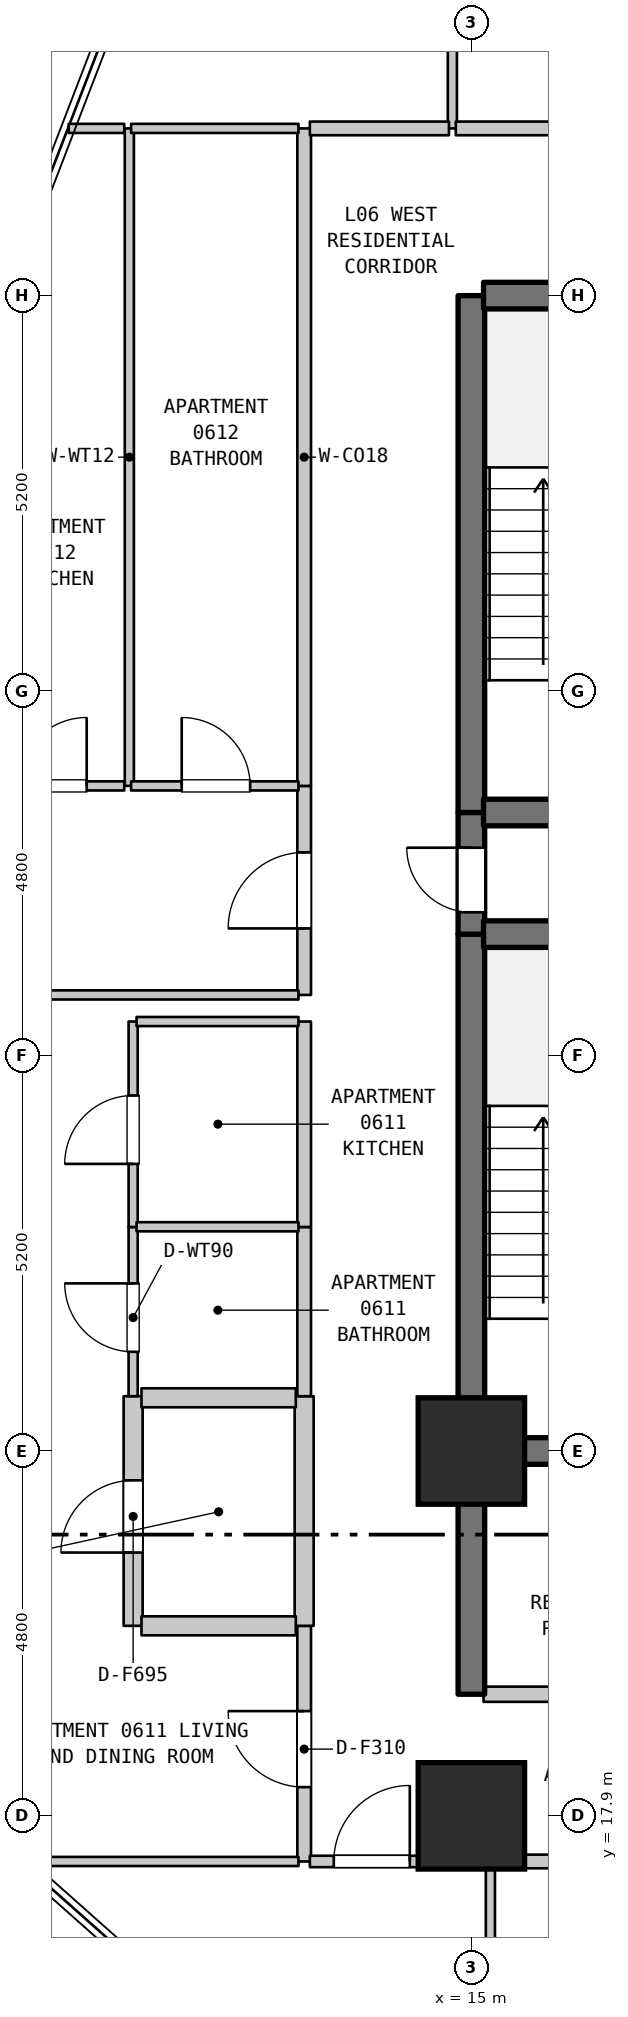
"""IFC4 building model, lengths in metres.
Left out: names, types, materials, properties, quantities, classifications, styles, units other than length and angle.
Written with IfcOpenShell. Run it as: python <this file> out.ifc"""

import sys

from ifc_helpers import new_model, si_unit, direction, frame, frame_2d, origin, origin_2d, place, context, subcontext, project, spatial, rectangle, extrude, element, fill, save


model = new_model("IFC4")
c1 = context("Model", 3, precision=1e-05, world=origin(), true_north=direction((0.0, 1.0)))
c2 = subcontext(c1, "Body", "Model", "MODEL_VIEW")
j1 = project(units=[si_unit("LENGTHUNIT", "METRE"), si_unit("PLANEANGLEUNIT", "RADIAN")], contexts=[c1])
p1 = place(None, origin())
s1 = spatial("IfcSite", under=j1, at=p1, CompositionType="ELEMENT")
p2 = place(p1, origin())
s2 = spatial("IfcBuilding", under=s1, at=p2, CompositionType="ELEMENT")
p3 = place(p2, frame((0.0, 0.0, 31.4)))
s3 = spatial("IfcBuildingStorey", under=s2, at=p3, CompositionType="ELEMENT", Elevation=31.4)
for number, where, z_axis, x_axis in (
    (1, (15.0, 17.9, 0.0), (0.0, 0.0, 1.0), (1.0, 0.0, 0.0)),
    (2, (15.0, 22.7, 0.0), (0.0, 0.0, 1.0), (1.0, 0.0, 0.0)),
):
    element("IfcColumn", number, at=place(p3, frame(where, z_axis=z_axis, x_axis=x_axis)), inside=s3, PredefinedType="COLUMN", context=c2, shape_type="SweptSolid", body=[
        extrude(rectangle(XDim=1.4, YDim=1.4, at=origin_2d()), origin(), (0.0, 0.0, 1.0), 3.7),
    ])
p4 = place(p3, frame((10.5, 31.45, 0.0), z_axis=(0.0, 0.0, 1.0), x_axis=(0.0, 1.0, 0.0)))
e3 = element("IfcWall", 3, at=p4, inside=s3, PredefinedType="PARTITIONING", context=c2, shape_type="SweptSolid", body=[
    extrude(rectangle(XDim=8.65, YDim=0.12, at=frame_2d((4.325, 0.0))), origin(), (0.0, 0.0, 1.0), 3.385),
])
p5 = place(p3, frame((10.55, 20.4, 0.0), z_axis=(0.0, 0.0, 1.0), x_axis=(0.0, 1.0, 0.0)))
e4 = element("IfcWall", 4, at=p5, inside=s3, PredefinedType="STANDARD", context=c2, shape_type="SweptSolid", body=[
    extrude(rectangle(XDim=3.021, YDim=0.25, at=frame_2d((1.51, 0.0))), origin(), (0.0, 0.0, 1.0), 3.385),
])
p6 = place(p5, frame((0.964, 0.0, 0.0)))
e5 = element("IfcOpeningElement", 5, at=p6, cuts=e4, PredefinedType="OPENING", context=c2, shape_type="SweptSolid", body=[
    extrude(rectangle(XDim=0.95, YDim=2.15, at=frame_2d((0.475, 1.075))), frame((0.0, 0.135, 0.0), z_axis=(0.0, -1.0, 0.0), x_axis=(1.0, 0.0, 0.0)), (0.0, 0.0, 1.0), 0.27),
])
p7 = place(p3, frame((10.55, 23.421, 0.0), z_axis=(0.0, 0.0, 1.0), x_axis=(0.0, 1.0, 0.0)))
e6 = element("IfcWall", 6, at=p7, inside=s3, PredefinedType="PARTITIONING", context=c2, shape_type="SweptSolid", body=[
    extrude(rectangle(XDim=2.226, YDim=0.12, at=frame_2d((1.113, 0.0))), origin(), (0.0, 0.0, 1.0), 3.385),
])
p8 = place(p7, frame((0.584, 0.0, 0.0)))
e7 = element("IfcOpeningElement", 7, at=p8, cuts=e6, PredefinedType="OPENING", context=c2, shape_type="SweptSolid", body=[
    extrude(rectangle(XDim=0.9, YDim=2.1, at=frame_2d((0.45, 1.05))), frame((0.0, 0.07, 0.0), z_axis=(0.0, -1.0, 0.0), x_axis=(1.0, 0.0, 0.0)), (0.0, 0.0, 1.0), 0.14),
])
p9 = place(p3, frame((10.55, 25.647, 0.0), z_axis=(0.0, 0.0, 1.0), x_axis=(0.0, 1.0, 0.0)))
e8 = element("IfcWall", 8, at=p9, inside=s3, PredefinedType="PARTITIONING", context=c2, shape_type="SweptSolid", body=[
    extrude(rectangle(XDim=2.703, YDim=0.12, at=frame_2d((1.352, 0.0))), origin(), (0.0, 0.0, 1.0), 3.385),
])
p10 = place(p9, frame((0.83, 0.0, 0.0)))
e9 = element("IfcOpeningElement", 9, at=p10, cuts=e8, PredefinedType="OPENING", context=c2, shape_type="SweptSolid", body=[
    extrude(rectangle(XDim=0.9, YDim=2.15, at=frame_2d((0.45, 1.075))), frame((0.0, 0.07, 0.0), z_axis=(0.0, -1.0, 0.0), x_axis=(1.0, 0.0, 0.0)), (0.0, 0.0, 1.0), 0.14),
])
p11 = place(p3, frame((12.8, 17.3, 0.0), z_axis=(0.0, 0.0, 1.0), x_axis=(0.0, 1.0, 0.0)))
e10 = element("IfcWall", 10, at=p11, inside=s3, PredefinedType="STANDARD", context=c2, shape_type="SweptSolid", body=[
    extrude(rectangle(XDim=3.1, YDim=0.18, at=frame_2d((1.55, 0.0))), origin(), (0.0, 0.0, 1.0), 3.385),
])
p12 = place(p11, frame((0.978, 0.0, 0.0)))
e11 = element("IfcOpeningElement", 11, at=p12, cuts=e10, PredefinedType="OPENING", context=c2, shape_type="SweptSolid", body=[
    extrude(rectangle(XDim=1.0, YDim=2.15, at=frame_2d((0.5, 1.075))), frame((0.0, 0.1, 0.0), z_axis=(0.0, -1.0, 0.0), x_axis=(1.0, 0.0, 0.0)), (0.0, 0.0, 1.0), 0.2),
])
p13 = place(p3, frame((12.8, 20.4, 0.0), z_axis=(0.0, 0.0, 1.0), x_axis=(0.0, 1.0, 0.0)))
e12 = element("IfcWall", 12, at=p13, inside=s3, PredefinedType="STANDARD", context=c2, shape_type="SweptSolid", body=[
    extrude(rectangle(XDim=3.021, YDim=0.25, at=frame_2d((1.51, 0.0))), origin(), (0.0, 0.0, 1.0), 3.385),
])
p14 = place(p3, frame((12.8, 23.421, 0.0), z_axis=(0.0, 0.0, 1.0), x_axis=(0.0, 1.0, 0.0)))
e13 = element("IfcWall", 13, at=p14, inside=s3, PredefinedType="STANDARD", context=c2, shape_type="SweptSolid", body=[
    extrude(rectangle(XDim=2.226, YDim=0.18, at=frame_2d((1.113, 0.0))), origin(), (0.0, 0.0, 1.0), 3.385),
])
p15 = place(p3, frame((12.8, 25.647, 0.0), z_axis=(0.0, 0.0, 1.0), x_axis=(0.0, 1.0, 0.0)))
e14 = element("IfcWall", 14, at=p15, inside=s3, PredefinedType="STANDARD", context=c2, shape_type="SweptSolid", body=[
    extrude(rectangle(XDim=2.703, YDim=0.18, at=frame_2d((1.352, 0.0))), origin(), (0.0, 0.0, 1.0), 3.385),
])
p16 = place(p3, frame((12.8, 28.7, 0.0), z_axis=(0.0, 0.0, 1.0), x_axis=(0.0, 1.0, 0.0)))
e15 = element("IfcWall", 15, at=p16, inside=s3, PredefinedType="STANDARD", context=c2, shape_type="SweptSolid", body=[
    extrude(rectangle(XDim=2.75, YDim=0.18, at=frame_2d((1.375, 0.0))), origin(), (0.0, 0.0, 1.0), 3.385),
])
p17 = place(p16, frame((0.875, 0.0, 0.0)))
e16 = element("IfcOpeningElement", 16, at=p17, cuts=e15, PredefinedType="OPENING", context=c2, shape_type="SweptSolid", body=[
    extrude(rectangle(XDim=1.0, YDim=2.15, at=frame_2d((0.5, 1.075))), frame((0.0, 0.1, 0.0), z_axis=(0.0, -1.0, 0.0), x_axis=(1.0, 0.0, 0.0)), (0.0, 0.0, 1.0), 0.2),
])
p18 = place(p3, frame((12.8, 31.45, 0.0), z_axis=(0.0, 0.0, 1.0), x_axis=(0.0, 1.0, 0.0)))
e17 = element("IfcWall", 17, at=p18, inside=s3, PredefinedType="STANDARD", context=c2, shape_type="SweptSolid", body=[
    extrude(rectangle(XDim=8.65, YDim=0.18, at=frame_2d((4.325, 0.0))), origin(), (0.0, 0.0, 1.0), 3.385),
])
p19 = place(p3, frame((14.75, 40.1, 0.0), z_axis=(0.0, 0.0, 1.0), x_axis=(0.0, 1.0, 0.0)))
e18 = element("IfcWall", 18, at=p19, inside=s3, PredefinedType="PARTITIONING", context=c2, shape_type="SweptSolid", body=[
    extrude(rectangle(XDim=3.2, YDim=0.12, at=frame_2d((1.6, 0.0))), origin(), (0.0, 0.0, 1.0), 3.385),
])
p20 = place(p19, frame((1.15, 0.0, 0.0)))
e19 = element("IfcOpeningElement", 19, at=p20, cuts=e18, PredefinedType="OPENING", context=c2, shape_type="SweptSolid", body=[
    extrude(rectangle(XDim=0.9, YDim=2.15, at=frame_2d((0.45, 1.075))), frame((0.0, 0.07, 0.0), z_axis=(0.0, -1.0, 0.0), x_axis=(1.0, 0.0, 0.0)), (0.0, 0.0, 1.0), 0.14),
])
p21 = place(p3, frame((15.0, 19.5, 0.0), z_axis=(0.0, 0.0, 1.0), x_axis=(0.0, 1.0, 0.0)))
e20 = element("IfcWall", 20, at=p21, inside=s3, PredefinedType="SHEAR", context=c2, shape_type="SweptSolid", body=[
    extrude(rectangle(XDim=3.2, YDim=0.35, at=frame_2d((1.6, 0.0))), origin(), (0.0, 0.0, 1.0), 3.385),
])
p22 = place(p3, frame((15.0, 22.7, 0.0), z_axis=(0.0, 0.0, 1.0), x_axis=(0.0, 1.0, 0.0)))
e21 = element("IfcWall", 21, at=p22, inside=s3, PredefinedType="SHEAR", context=c2, shape_type="SweptSolid", body=[
    extrude(rectangle(XDim=6.8, YDim=0.35, at=frame_2d((3.4, 0.0))), origin(), (0.0, 0.0, 1.0), 3.385),
])
p23 = place(p3, frame((15.0, 29.5, 0.0), z_axis=(0.0, 0.0, 1.0), x_axis=(0.0, 1.0, 0.0)))
e22 = element("IfcWall", 22, at=p23, inside=s3, PredefinedType="SHEAR", context=c2, shape_type="SweptSolid", body=[
    extrude(rectangle(XDim=1.6, YDim=0.35, at=frame_2d((0.8, 0.0))), origin(), (0.0, 0.0, 1.0), 3.385),
])
p24 = place(p23, frame((0.287, 0.0, 0.0)))
e23 = element("IfcOpeningElement", 23, at=p24, cuts=e22, PredefinedType="OPENING", context=c2, shape_type="SweptSolid", body=[
    extrude(rectangle(XDim=0.85, YDim=2.1, at=frame_2d((0.425, 1.05))), frame((0.0, 0.185, 0.0), z_axis=(0.0, -1.0, 0.0), x_axis=(1.0, 0.0, 0.0)), (0.0, 0.0, 1.0), 0.37),
])
p25 = place(p3, frame((15.0, 31.1, 0.0), z_axis=(0.0, 0.0, 1.0), x_axis=(0.0, 1.0, 0.0)))
e24 = element("IfcWall", 24, at=p25, inside=s3, PredefinedType="SHEAR", context=c2, shape_type="SweptSolid", body=[
    extrude(rectangle(XDim=6.8, YDim=0.35, at=frame_2d((3.4, 0.0))), origin(), (0.0, 0.0, 1.0), 3.385),
])
p26 = place(p3, frame((15.25, 14.1, 0.0), z_axis=(0.0, 0.0, 1.0), x_axis=(0.0, 1.0, 0.0)))
e25 = element("IfcWall", 25, at=p26, inside=s3, PredefinedType="PARTITIONING", context=c2, shape_type="SweptSolid", body=[
    extrude(rectangle(XDim=3.2, YDim=0.12, at=frame_2d((1.6, 0.0))), origin(), (0.0, 0.0, 1.0), 3.385),
])
p27 = place(p3, frame((9.085, 17.3, 0.0), z_axis=(0.0, 0.0, 1.0), x_axis=(1.0, 0.0, 0.0)))
e26 = element("IfcWall", 26, at=p27, inside=s3, PredefinedType="PARTITIONING", context=c2, shape_type="SweptSolid", body=[
    extrude(rectangle(XDim=3.64, YDim=0.12, at=frame_2d((1.82, 0.0))), origin(), (0.0, 0.0, 1.0), 3.385),
])
p28 = place(p3, frame((12.875, 17.3, 0.0), z_axis=(0.0, 0.0, 1.0), x_axis=(1.0, 0.0, 0.0)))
e27 = element("IfcWall", 27, at=p28, inside=s3, PredefinedType="STANDARD", context=c2, shape_type="SweptSolid", body=[
    extrude(rectangle(XDim=2.33, YDim=0.15, at=frame_2d((1.165, 0.0))), origin(), (0.0, 0.0, 1.0), 3.385),
])
p29 = place(p28, frame((0.315, 0.0, 0.0)))
e28 = element("IfcOpeningElement", 28, at=p29, cuts=e27, PredefinedType="OPENING", context=c2, shape_type="SweptSolid", body=[
    extrude(rectangle(XDim=1.0, YDim=2.15, at=frame_2d((0.5, 1.075))), frame((0.0, 0.085, 0.0), z_axis=(0.0, -1.0, 0.0), x_axis=(1.0, 0.0, 0.0)), (0.0, 0.0, 1.0), 0.17),
])
p30 = place(p3, frame((15.295, 17.3, 0.0), z_axis=(0.0, 0.0, 1.0), x_axis=(1.0, 0.0, 0.0)))
e29 = element("IfcWall", 29, at=p30, inside=s3, PredefinedType="STANDARD", context=c2, shape_type="SweptSolid", body=[
    extrude(rectangle(XDim=2.26, YDim=0.18, at=frame_2d((1.13, 0.0))), origin(), (0.0, 0.0, 1.0), 3.385),
])
p31 = place(p3, frame((15.16, 19.5, 0.0), z_axis=(0.0, 0.0, 1.0), x_axis=(1.0, 0.0, 0.0)))
e30 = element("IfcWall", 30, at=p31, inside=s3, PredefinedType="STANDARD", context=c2, shape_type="SweptSolid", body=[
    extrude(rectangle(XDim=3.68, YDim=0.2, at=frame_2d((1.84, 0.0))), origin(), (0.0, 0.0, 1.0), 3.385),
])
p32 = place(p31, frame((1.39, 0.0, 0.0)))
e31 = element("IfcOpeningElement", 31, at=p32, cuts=e30, PredefinedType="OPENING", context=c2, shape_type="SweptSolid", body=[
    extrude(rectangle(XDim=0.9, YDim=2.15, at=frame_2d((0.45, 1.075))), frame((0.0, 0.11, 0.0), z_axis=(0.0, -1.0, 0.0), x_axis=(1.0, 0.0, 0.0)), (0.0, 0.0, 1.0), 0.22),
])
p33 = place(p3, frame((10.66, 20.4, 0.0), z_axis=(0.0, 0.0, 1.0), x_axis=(1.0, 0.0, 0.0)))
e32 = element("IfcWall", 32, at=p33, inside=s3, PredefinedType="STANDARD", context=c2, shape_type="SweptSolid", body=[
    extrude(rectangle(XDim=2.03, YDim=0.25, at=frame_2d((1.015, 0.0))), origin(), (0.0, 0.0, 1.0), 3.385),
])
p34 = place(p3, frame((15.16, 22.7, 0.0), z_axis=(0.0, 0.0, 1.0), x_axis=(1.0, 0.0, 0.0)))
e33 = element("IfcWall", 33, at=p34, inside=s3, PredefinedType="SHEAR", context=c2, shape_type="SweptSolid", body=[
    extrude(rectangle(XDim=3.68, YDim=0.35, at=frame_2d((1.84, 0.0))), origin(), (0.0, 0.0, 1.0), 3.385),
])
p35 = place(p3, frame((10.66, 23.4, 0.0), z_axis=(0.0, 0.0, 1.0), x_axis=(1.0, 0.0, 0.0)))
e34 = element("IfcWall", 34, at=p35, inside=s3, PredefinedType="STANDARD", context=c2, shape_type="SweptSolid", body=[
    extrude(rectangle(XDim=2.03, YDim=0.25, at=frame_2d((1.015, 0.0))), origin(), (0.0, 0.0, 1.0), 3.385),
])
for number, where, z_axis, x_axis in (
    (35, (10.595, 25.65, 0.0), (0.0, 0.0, 1.0), (1.0, 0.0, 0.0)),
    (36, (10.595, 28.35, 0.0), (0.0, 0.0, 1.0), (1.0, 0.0, 0.0)),
):
    element("IfcWall", number, at=place(p3, frame(where, z_axis=z_axis, x_axis=x_axis)), inside=s3, PredefinedType="PARTITIONING", context=c2, shape_type="SweptSolid", body=[
        extrude(rectangle(XDim=2.13, YDim=0.12, at=frame_2d((1.065, 0.0))), origin(), (0.0, 0.0, 1.0), 3.385),
    ])
p36 = place(p3, frame((9.03, 28.7, 0.0), z_axis=(0.0, 0.0, 1.0), x_axis=(1.0, 0.0, 0.0)))
e37 = element("IfcWall", 37, at=p36, inside=s3, PredefinedType="PARTITIONING", context=c2, shape_type="SweptSolid", body=[
    extrude(rectangle(XDim=3.695, YDim=0.12, at=frame_2d((1.848, 0.0))), origin(), (0.0, 0.0, 1.0), 3.385),
])
for number, where, z_axis, x_axis in (
    (38, (15.16, 29.5, 0.0), (0.0, 0.0, 1.0), (1.0, 0.0, 0.0)),
    (39, (15.16, 31.1, 0.0), (0.0, 0.0, 1.0), (1.0, 0.0, 0.0)),
):
    element("IfcWall", number, at=place(p3, frame(where, z_axis=z_axis, x_axis=x_axis)), inside=s3, PredefinedType="SHEAR", context=c2, shape_type="SweptSolid", body=[
        extrude(rectangle(XDim=3.68, YDim=0.35, at=frame_2d((1.84, 0.0))), origin(), (0.0, 0.0, 1.0), 3.385),
    ])
p37 = place(p3, frame((8.545, 31.45, 0.0), z_axis=(0.0, 0.0, 1.0), x_axis=(1.0, 0.0, 0.0)))
e40 = element("IfcWall", 40, at=p37, inside=s3, PredefinedType="PARTITIONING", context=c2, shape_type="SweptSolid", body=[
    extrude(rectangle(XDim=1.888, YDim=0.12, at=frame_2d((0.944, 0.0))), origin(), (0.0, 0.0, 1.0), 3.385),
])
p38 = place(p37, frame((0.494, 0.0, 0.0)))
e41 = element("IfcOpeningElement", 41, at=p38, cuts=e40, PredefinedType="OPENING", context=c2, shape_type="SweptSolid", body=[
    extrude(rectangle(XDim=0.9, YDim=2.15, at=frame_2d((0.45, 1.075))), frame((0.0, 0.07, 0.0), z_axis=(0.0, -1.0, 0.0), x_axis=(1.0, 0.0, 0.0)), (0.0, 0.0, 1.0), 0.14),
])
p39 = place(p3, frame((10.523, 31.45, 0.0), z_axis=(0.0, 0.0, 1.0), x_axis=(1.0, 0.0, 0.0)))
e42 = element("IfcWall", 42, at=p39, inside=s3, PredefinedType="PARTITIONING", context=c2, shape_type="SweptSolid", body=[
    extrude(rectangle(XDim=2.202, YDim=0.12, at=frame_2d((1.101, 0.0))), origin(), (0.0, 0.0, 1.0), 3.385),
])
p40 = place(p39, frame((0.666, 0.0, 0.0)))
e43 = element("IfcOpeningElement", 43, at=p40, cuts=e42, PredefinedType="OPENING", context=c2, shape_type="SweptSolid", body=[
    extrude(rectangle(XDim=0.9, YDim=2.1, at=frame_2d((0.45, 1.05))), frame((0.0, 0.07, 0.0), z_axis=(0.0, -1.0, 0.0), x_axis=(1.0, 0.0, 0.0)), (0.0, 0.0, 1.0), 0.14),
])
p41 = place(p3, frame((15.16, 37.9, 0.0), z_axis=(0.0, 0.0, 1.0), x_axis=(1.0, 0.0, 0.0)))
e44 = element("IfcWall", 44, at=p41, inside=s3, PredefinedType="SHEAR", context=c2, shape_type="SweptSolid", body=[
    extrude(rectangle(XDim=3.68, YDim=0.35, at=frame_2d((1.84, 0.0))), origin(), (0.0, 0.0, 1.0), 3.385),
])
p42 = place(p3, frame((9.702, 40.1, 0.0), z_axis=(0.0, 0.0, 1.0), x_axis=(1.0, 0.0, 0.0)))
e45 = element("IfcWall", 45, at=p42, inside=s3, PredefinedType="PARTITIONING", context=c2, shape_type="SweptSolid", body=[
    extrude(rectangle(XDim=0.731, YDim=0.12, at=frame_2d((0.366, 0.0))), origin(), (0.0, 0.0, 1.0), 3.385),
])
p43 = place(p3, frame((10.523, 40.1, 0.0), z_axis=(0.0, 0.0, 1.0), x_axis=(1.0, 0.0, 0.0)))
e46 = element("IfcWall", 46, at=p43, inside=s3, PredefinedType="PARTITIONING", context=c2, shape_type="SweptSolid", body=[
    extrude(rectangle(XDim=2.202, YDim=0.12, at=frame_2d((1.101, 0.0))), origin(), (0.0, 0.0, 1.0), 3.385),
])
p44 = place(p3, frame((12.875, 40.1, 0.0), z_axis=(0.0, 0.0, 1.0), x_axis=(1.0, 0.0, 0.0)))
e47 = element("IfcWall", 47, at=p44, inside=s3, PredefinedType="STANDARD", context=c2, shape_type="SweptSolid", body=[
    extrude(rectangle(XDim=1.83, YDim=0.18, at=frame_2d((0.915, 0.0))), origin(), (0.0, 0.0, 1.0), 3.385),
])
p45 = place(p3, frame((14.795, 40.1, 0.0), z_axis=(0.0, 0.0, 1.0), x_axis=(1.0, 0.0, 0.0)))
e48 = element("IfcWall", 48, at=p45, inside=s3, PredefinedType="STANDARD", context=c2, shape_type="SweptSolid", body=[
    extrude(rectangle(XDim=2.26, YDim=0.18, at=frame_2d((1.13, 0.0))), origin(), (0.0, 0.0, 1.0), 3.385),
])
p46 = place(p6, origin())
e49 = element("IfcDoor", 49, at=p46, inside=s3, OperationType="SINGLE_SWING_LEFT", PredefinedType="DOOR", context=c2, shape_type="SweptSolid", body=[
    extrude(rectangle(XDim=0.95, YDim=2.15, at=frame_2d((0.475, 1.075))), frame((0.0, 0.025, 0.0), z_axis=(0.0, -1.0, 0.0), x_axis=(1.0, 0.0, 0.0)), (0.0, 0.0, 1.0), 0.05),
])
fill(e5, e49)
p47 = place(p8, origin())
e50 = element("IfcDoor", 50, at=p47, inside=s3, OperationType="SINGLE_SWING_RIGHT", PredefinedType="DOOR", context=c2, shape_type="SweptSolid", body=[
    extrude(rectangle(XDim=0.9, YDim=2.1, at=frame_2d((0.45, 1.05))), frame((0.0, 0.025, 0.0), z_axis=(0.0, -1.0, 0.0), x_axis=(1.0, 0.0, 0.0)), (0.0, 0.0, 1.0), 0.05),
])
fill(e7, e50)
p48 = place(p10, origin())
e51 = element("IfcDoor", 51, at=p48, inside=s3, OperationType="SINGLE_SWING_LEFT", PredefinedType="DOOR", context=c2, shape_type="SweptSolid", body=[
    extrude(rectangle(XDim=0.9, YDim=2.15, at=frame_2d((0.45, 1.075))), frame((0.0, 0.025, 0.0), z_axis=(0.0, -1.0, 0.0), x_axis=(1.0, 0.0, 0.0)), (0.0, 0.0, 1.0), 0.05),
])
fill(e9, e51)
p49 = place(p12, origin())
e52 = element("IfcDoor", 52, at=p49, inside=s3, OperationType="SINGLE_SWING_RIGHT", PredefinedType="DOOR", context=c2, shape_type="SweptSolid", body=[
    extrude(rectangle(XDim=1.0, YDim=2.15, at=frame_2d((0.5, 1.075))), frame((0.0, 0.025, 0.0), z_axis=(0.0, -1.0, 0.0), x_axis=(1.0, 0.0, 0.0)), (0.0, 0.0, 1.0), 0.05),
])
fill(e11, e52)
p50 = place(p17, origin())
e53 = element("IfcDoor", 53, at=p50, inside=s3, OperationType="SINGLE_SWING_LEFT", PredefinedType="DOOR", context=c2, shape_type="SweptSolid", body=[
    extrude(rectangle(XDim=1.0, YDim=2.15, at=frame_2d((0.5, 1.075))), frame((0.0, 0.025, 0.0), z_axis=(0.0, -1.0, 0.0), x_axis=(1.0, 0.0, 0.0)), (0.0, 0.0, 1.0), 0.05),
])
fill(e16, e53)
p51 = place(p24, origin())
e54 = element("IfcDoor", 54, at=p51, inside=s3, OperationType="SINGLE_SWING_RIGHT", PredefinedType="DOOR", context=c2, shape_type="SweptSolid", body=[
    extrude(rectangle(XDim=0.85, YDim=2.1, at=frame_2d((0.425, 1.05))), frame((0.0, 0.025, 0.0), z_axis=(0.0, -1.0, 0.0), x_axis=(1.0, 0.0, 0.0)), (0.0, 0.0, 1.0), 0.05),
])
fill(e23, e54)
p52 = place(p29, origin())
e55 = element("IfcDoor", 55, at=p52, inside=s3, OperationType="SINGLE_SWING_RIGHT", PredefinedType="DOOR", context=c2, shape_type="SweptSolid", body=[
    extrude(rectangle(XDim=1.0, YDim=2.15, at=frame_2d((0.5, 1.075))), frame((0.0, 0.025, 0.0), z_axis=(0.0, -1.0, 0.0), x_axis=(1.0, 0.0, 0.0)), (0.0, 0.0, 1.0), 0.05),
])
fill(e28, e55)
p53 = place(p38, origin())
e56 = element("IfcDoor", 56, at=p53, inside=s3, OperationType="SINGLE_SWING_RIGHT", PredefinedType="DOOR", context=c2, shape_type="SweptSolid", body=[
    extrude(rectangle(XDim=0.9, YDim=2.15, at=frame_2d((0.45, 1.075))), frame((0.0, 0.025, 0.0), z_axis=(0.0, -1.0, 0.0), x_axis=(1.0, 0.0, 0.0)), (0.0, 0.0, 1.0), 0.05),
])
fill(e41, e56)
p54 = place(p40, origin())
e57 = element("IfcDoor", 57, at=p54, inside=s3, OperationType="SINGLE_SWING_LEFT", PredefinedType="DOOR", context=c2, shape_type="SweptSolid", body=[
    extrude(rectangle(XDim=0.9, YDim=2.1, at=frame_2d((0.45, 1.05))), frame((0.0, 0.025, 0.0), z_axis=(0.0, -1.0, 0.0), x_axis=(1.0, 0.0, 0.0)), (0.0, 0.0, 1.0), 0.05),
])
fill(e43, e57)
save(model, sys.argv[1])
